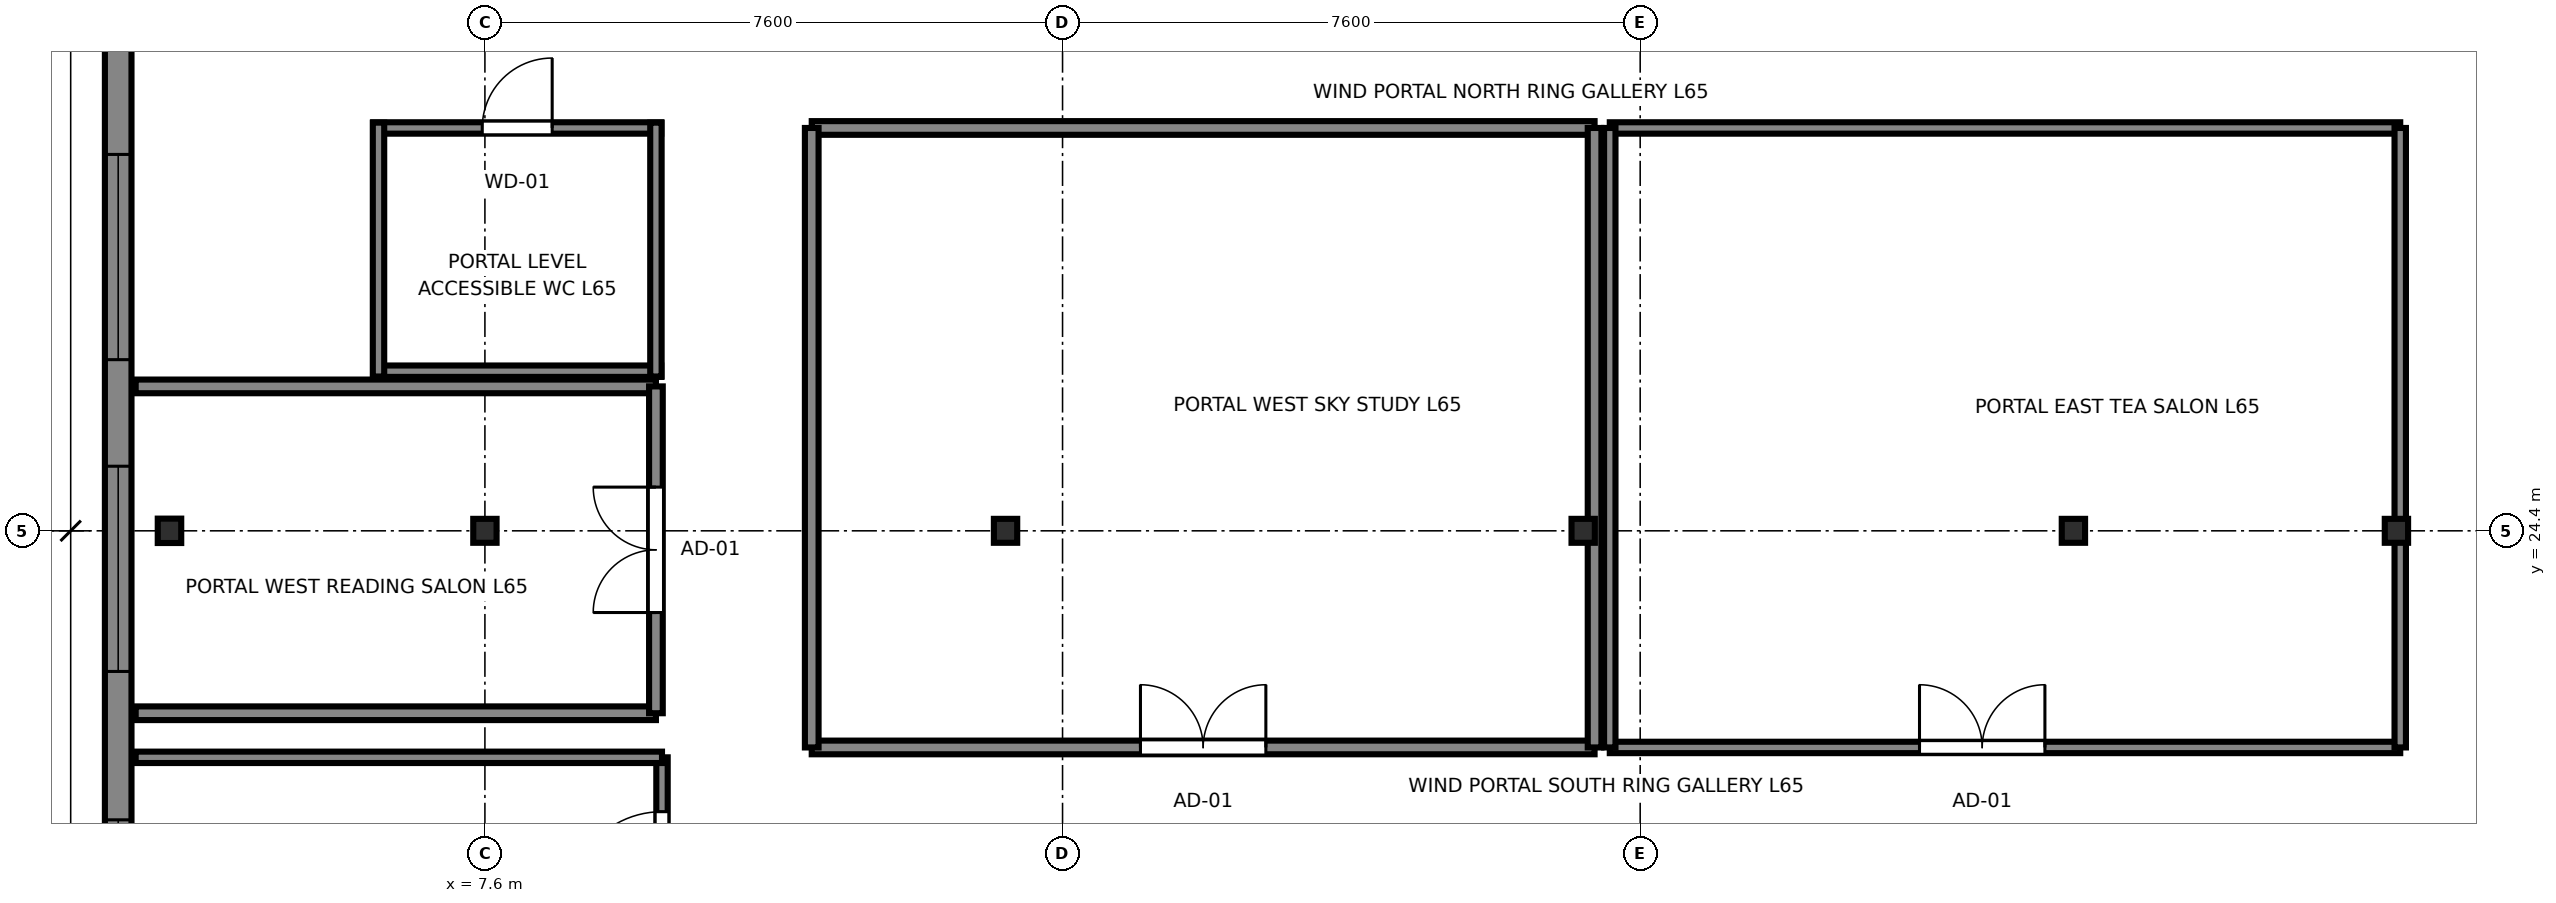
"""IFC4 building model, lengths in metres.
Left out: names, types, materials, properties, quantities, classifications, styles, units other than length and angle.
Written with IfcOpenShell. Run it as: python <this file> out.ifc"""

import sys

from ifc_helpers import new_model, si_unit, direction, frame, frame_2d, origin, origin_2d, place, context, subcontext, project, spatial, rectangle, i_section, extrude, source, transform, mapped, element, fill, save


model = new_model("IFC4")
c1 = context("Model", 3, precision=1e-05, world=origin(), true_north=direction((0.0, 1.0)))
c2 = subcontext(c1, "Body", "Model", "MODEL_VIEW")
j1 = project(units=[si_unit("LENGTHUNIT", "METRE"), si_unit("PLANEANGLEUNIT", "RADIAN")], contexts=[c1])
p1 = place(None, origin())
s1 = spatial("IfcSite", under=j1, at=p1, CompositionType="ELEMENT")
p2 = place(p1, origin())
s2 = spatial("IfcBuilding", under=s1, at=p2, CompositionType="ELEMENT")
p3 = place(p2, frame((0.0, 0.0, 245.2)))
s3 = spatial("IfcBuildingStorey", under=s2, at=p3, CompositionType="ELEMENT", Elevation=245.2)
m1 = source(origin(), c2, "Body", "SweptSolid", [
    extrude(i_section(OverallWidth=0.309, OverallDepth=0.321, WebThickness=0.014, FlangeThickness=0.022, FilletRadius=0.017, at=origin_2d()), origin(), (0.0, 0.0, 1.0), 3.55),
])
p4 = place(p3, frame((3.45, 24.4, 0.0), z_axis=(0.0, 0.0, 1.0), x_axis=(1.0, 0.0, 0.0)))
e1 = element("IfcColumn", 1, at=p4, inside=s3, PredefinedType="COLUMN", context=c2, shape_type="MappedRepresentation", body=[
    mapped(m1, transform((0.0, 0.0, 0.0), x_axis=(1.0, 0.0, 0.0), y_axis=(0.0, 1.0, 0.0), z_axis=(0.0, 0.0, 1.0), scale=1.0)),
])
m2 = source(origin(), c2, "Body", "SweptSolid", [
    extrude(i_section(OverallWidth=0.307, OverallDepth=0.315, WebThickness=0.012, FlangeThickness=0.019, FilletRadius=0.017, at=origin_2d()), origin(), (0.0, 0.0, 1.0), 3.55),
])
for number, where, z_axis, x_axis in (
    (2, (7.6, 24.4, 0.0), (0.0, 0.0, 1.0), (1.0, 0.0, 0.0)),
    (3, (14.45, 24.4, 0.0), (0.0, 0.0, 1.0), (1.0, 0.0, 0.0)),
    (4, (22.05, 24.4, 0.0), (0.0, 0.0, 1.0), (1.0, 0.0, 0.0)),
    (5, (28.5, 24.4, 0.0), (0.0, 0.0, 1.0), (1.0, 0.0, 0.0)),
    (6, (32.75, 24.4, 0.0), (0.0, 0.0, 1.0), (1.0, 0.0, 0.0)),
):
    element("IfcColumn", number, at=place(p3, frame(where, z_axis=z_axis, x_axis=x_axis)), inside=s3, PredefinedType="COLUMN", context=c2, shape_type="MappedRepresentation", body=[
        mapped(m2, transform((0.0, 0.0, 0.0), x_axis=(1.0, 0.0, 0.0), y_axis=(0.0, 1.0, 0.0), z_axis=(0.0, 0.0, 1.0), scale=1.0)),
    ])
p5 = place(p3, frame((2.775, 40.783, 0.0), z_axis=(0.0, 0.0, 1.0), x_axis=(0.0, -1.0, 0.0)))
e7 = element("IfcWall", 7, at=p5, inside=s3, PredefinedType="SOLIDWALL", context=c2, shape_type="SweptSolid", body=[
    extrude(rectangle(XDim=33.766, YDim=0.35, at=frame_2d((16.883, 0.0))), origin(), (0.0, 0.0, 1.0), 3.37),
])
p6 = place(p5, frame((1.576, 0.0, 0.68)))
e8 = element("IfcOpeningElement", 8, at=p6, cuts=e7, PredefinedType="OPENING", context=c2, shape_type="SweptSolid", body=[
    extrude(rectangle(XDim=2.7, YDim=1.95, at=frame_2d((1.35, 0.975))), frame((0.0, 0.185, 0.0), z_axis=(0.0, -1.0, 0.0), x_axis=(1.0, 0.0, 0.0)), (0.0, 0.0, 1.0), 0.37),
])
p7 = place(p5, frame((6.228, 0.0, 0.68)))
e9 = element("IfcOpeningElement", 9, at=p7, cuts=e7, PredefinedType="OPENING", context=c2, shape_type="SweptSolid", body=[
    extrude(rectangle(XDim=2.7, YDim=1.95, at=frame_2d((1.35, 0.975))), frame((0.0, 0.185, 0.0), z_axis=(0.0, -1.0, 0.0), x_axis=(1.0, 0.0, 0.0)), (0.0, 0.0, 1.0), 0.37),
])
p8 = place(p5, frame((11.431, 0.0, 0.68)))
e10 = element("IfcOpeningElement", 10, at=p8, cuts=e7, PredefinedType="OPENING", context=c2, shape_type="SweptSolid", body=[
    extrude(rectangle(XDim=2.7, YDim=1.95, at=frame_2d((1.35, 0.975))), frame((0.0, 0.185, 0.0), z_axis=(0.0, -1.0, 0.0), x_axis=(1.0, 0.0, 0.0)), (0.0, 0.0, 1.0), 0.37),
])
p9 = place(p5, frame((15.533, 0.0, 0.68)))
e11 = element("IfcOpeningElement", 11, at=p9, cuts=e7, PredefinedType="OPENING", context=c2, shape_type="SweptSolid", body=[
    extrude(rectangle(XDim=2.7, YDim=1.95, at=frame_2d((1.35, 0.975))), frame((0.0, 0.185, 0.0), z_axis=(0.0, -1.0, 0.0), x_axis=(1.0, 0.0, 0.0)), (0.0, 0.0, 1.0), 0.37),
])
p10 = place(p5, frame((20.185, 0.0, 0.68)))
e12 = element("IfcOpeningElement", 12, at=p10, cuts=e7, PredefinedType="OPENING", context=c2, shape_type="SweptSolid", body=[
    extrude(rectangle(XDim=2.7, YDim=1.95, at=frame_2d((1.35, 0.975))), frame((0.0, 0.185, 0.0), z_axis=(0.0, -1.0, 0.0), x_axis=(1.0, 0.0, 0.0)), (0.0, 0.0, 1.0), 0.37),
])
p11 = place(p5, frame((24.837, 0.0, 0.68)))
e13 = element("IfcOpeningElement", 13, at=p11, cuts=e7, PredefinedType="OPENING", context=c2, shape_type="SweptSolid", body=[
    extrude(rectangle(XDim=2.7, YDim=1.95, at=frame_2d((1.35, 0.975))), frame((0.0, 0.185, 0.0), z_axis=(0.0, -1.0, 0.0), x_axis=(1.0, 0.0, 0.0)), (0.0, 0.0, 1.0), 0.37),
])
p12 = place(p5, frame((29.489, 0.0, 0.68)))
e14 = element("IfcOpeningElement", 14, at=p12, cuts=e7, PredefinedType="OPENING", context=c2, shape_type="SweptSolid", body=[
    extrude(rectangle(XDim=2.7, YDim=1.95, at=frame_2d((1.35, 0.975))), frame((0.0, 0.185, 0.0), z_axis=(0.0, -1.0, 0.0), x_axis=(1.0, 0.0, 0.0)), (0.0, 0.0, 1.0), 0.37),
])
p13 = place(p3, frame((9.93, 18.81, 0.0), z_axis=(0.0, 0.0, 1.0), x_axis=(0.0, 1.0, 0.0)))
e15 = element("IfcWall", 15, at=p13, inside=s3, PredefinedType="PARTITIONING", context=c2, shape_type="SweptSolid", body=[
    extrude(rectangle(XDim=2.61, YDim=0.15, at=frame_2d((1.305, 0.0))), origin(), (0.0, 0.0, 1.0), 3.37),
])
p14 = place(p13, frame((0.675, 0.0, 0.0)))
e16 = element("IfcOpeningElement", 16, at=p14, cuts=e15, PredefinedType="OPENING", context=c2, shape_type="SweptSolid", body=[
    extrude(rectangle(XDim=1.22, YDim=2.08, at=frame_2d((0.61, 1.04))), frame((0.0, 0.085, 0.0), z_axis=(0.0, -1.0, 0.0), x_axis=(1.0, 0.0, 0.0)), (0.0, 0.0, 1.0), 0.17),
])
p15 = place(p3, frame((3.005, 21.42, 0.0), z_axis=(0.0, 0.0, 1.0), x_axis=(1.0, 0.0, 0.0)))
e17 = element("IfcWall", 17, at=p15, inside=s3, PredefinedType="PARTITIONING", context=c2, shape_type="SweptSolid", body=[
    extrude(rectangle(XDim=6.925, YDim=0.15, at=frame_2d((3.462, 0.0))), origin(), (0.0, 0.0, 1.0), 3.37),
])
p16 = place(p3, frame((11.9, 21.55, 0.0), z_axis=(0.0, 0.0, 1.0), x_axis=(1.0, 0.0, 0.0)))
e18 = element("IfcWall", 18, at=p16, inside=s3, PredefinedType="PARTITIONING", context=c2, shape_type="SweptSolid", body=[
    extrude(rectangle(XDim=10.3, YDim=0.18, at=frame_2d((5.15, 0.0))), origin(), (0.0, 0.0, 1.0), 3.37),
])
p17 = place(p16, frame((4.325, 0.0, 0.0)))
e19 = element("IfcOpeningElement", 19, at=p17, cuts=e18, PredefinedType="OPENING", context=c2, shape_type="SweptSolid", body=[
    extrude(rectangle(XDim=1.65, YDim=2.15, at=frame_2d((0.825, 1.075))), frame((0.0, 0.1, 0.0), z_axis=(0.0, -1.0, 0.0), x_axis=(1.0, 0.0, 0.0)), (0.0, 0.0, 1.0), 0.2),
])
p18 = place(p3, frame((11.9, 29.7, 0.0), z_axis=(0.0, 0.0, 1.0), x_axis=(1.0, 0.0, 0.0)))
e20 = element("IfcWall", 20, at=p18, inside=s3, PredefinedType="PARTITIONING", context=c2, shape_type="SweptSolid", body=[
    extrude(rectangle(XDim=10.3, YDim=0.18, at=frame_2d((5.15, 0.0))), origin(), (0.0, 0.0, 1.0), 3.37),
])
p19 = place(p3, frame((11.9, 21.55, 0.0), z_axis=(0.0, 0.0, 1.0), x_axis=(0.0, 1.0, 0.0)))
e21 = element("IfcWall", 21, at=p19, inside=s3, PredefinedType="PARTITIONING", context=c2, shape_type="SweptSolid", body=[
    extrude(rectangle(XDim=8.15, YDim=0.18, at=frame_2d((4.075, 0.0))), origin(), (0.0, 0.0, 1.0), 3.37),
])
p20 = place(p3, frame((22.2, 21.55, 0.0), z_axis=(0.0, 0.0, 1.0), x_axis=(0.0, 1.0, 0.0)))
e22 = element("IfcWall", 22, at=p20, inside=s3, PredefinedType="PARTITIONING", context=c2, shape_type="SweptSolid", body=[
    extrude(rectangle(XDim=8.15, YDim=0.18, at=frame_2d((4.075, 0.0))), origin(), (0.0, 0.0, 1.0), 2.827),
])
p21 = place(p3, frame((22.4, 21.55, 0.0), z_axis=(0.0, 0.0, 1.0), x_axis=(1.0, 0.0, 0.0)))
e23 = element("IfcWall", 23, at=p21, inside=s3, PredefinedType="PARTITIONING", context=c2, shape_type="SweptSolid", body=[
    extrude(rectangle(XDim=10.4, YDim=0.15, at=frame_2d((5.2, 0.0))), origin(), (0.0, 0.0, 1.0), 3.37),
])
p22 = place(p21, frame((4.075, 0.0, 0.0)))
e24 = element("IfcOpeningElement", 24, at=p22, cuts=e23, PredefinedType="OPENING", context=c2, shape_type="SweptSolid", body=[
    extrude(rectangle(XDim=1.65, YDim=2.15, at=frame_2d((0.825, 1.075))), frame((0.0, 0.085, 0.0), z_axis=(0.0, -1.0, 0.0), x_axis=(1.0, 0.0, 0.0)), (0.0, 0.0, 1.0), 0.17),
])
p23 = place(p3, frame((22.4, 29.7, 0.0), z_axis=(0.0, 0.0, 1.0), x_axis=(1.0, 0.0, 0.0)))
e25 = element("IfcWall", 25, at=p23, inside=s3, PredefinedType="PARTITIONING", context=c2, shape_type="SweptSolid", body=[
    extrude(rectangle(XDim=10.4, YDim=0.15, at=frame_2d((5.2, 0.0))), origin(), (0.0, 0.0, 1.0), 3.37),
])
p24 = place(p3, frame((22.4, 21.55, 0.0), z_axis=(0.0, 0.0, 1.0), x_axis=(0.0, 1.0, 0.0)))
e26 = element("IfcWall", 26, at=p24, inside=s3, PredefinedType="PARTITIONING", context=c2, shape_type="SweptSolid", body=[
    extrude(rectangle(XDim=8.15, YDim=0.15, at=frame_2d((4.075, 0.0))), origin(), (0.0, 0.0, 1.0), 3.37),
])
p25 = place(p3, frame((32.8, 21.55, 0.0), z_axis=(0.0, 0.0, 1.0), x_axis=(0.0, 1.0, 0.0)))
e27 = element("IfcWall", 27, at=p25, inside=s3, PredefinedType="PARTITIONING", context=c2, shape_type="SweptSolid", body=[
    extrude(rectangle(XDim=8.15, YDim=0.15, at=frame_2d((4.075, 0.0))), origin(), (0.0, 0.0, 1.0), 2.827),
])
for number, where, z_axis, x_axis in (
    (28, (3.005, 22.0, 0.0), (0.0, 0.0, 1.0), (1.0, 0.0, 0.0)),
    (29, (3.005, 26.3, 0.0), (0.0, 0.0, 1.0), (1.0, 0.0, 0.0)),
):
    element("IfcWall", number, at=place(p3, frame(where, z_axis=z_axis, x_axis=x_axis)), inside=s3, PredefinedType="PARTITIONING", context=c2, shape_type="SweptSolid", body=[
        extrude(rectangle(XDim=6.845, YDim=0.18, at=frame_2d((3.423, 0.0))), origin(), (0.0, 0.0, 1.0), 3.37),
    ])
p26 = place(p3, frame((9.85, 22.0, 0.0), z_axis=(0.0, 0.0, 1.0), x_axis=(0.0, 1.0, 0.0)))
e30 = element("IfcWall", 30, at=p26, inside=s3, PredefinedType="PARTITIONING", context=c2, shape_type="SweptSolid", body=[
    extrude(rectangle(XDim=4.3, YDim=0.18, at=frame_2d((2.15, 0.0))), origin(), (0.0, 0.0, 1.0), 3.37),
])
p27 = place(p26, frame((1.325, 0.0, 0.0)))
e31 = element("IfcOpeningElement", 31, at=p27, cuts=e30, PredefinedType="OPENING", context=c2, shape_type="SweptSolid", body=[
    extrude(rectangle(XDim=1.65, YDim=2.15, at=frame_2d((0.825, 1.075))), frame((0.0, 0.1, 0.0), z_axis=(0.0, -1.0, 0.0), x_axis=(1.0, 0.0, 0.0)), (0.0, 0.0, 1.0), 0.2),
])
p28 = place(p3, frame((6.13, 26.5, 0.0), z_axis=(0.0, 0.0, 1.0), x_axis=(1.0, 0.0, 0.0)))
e32 = element("IfcWall", 32, at=p28, inside=s3, PredefinedType="PARTITIONING", context=c2, shape_type="SweptSolid", body=[
    extrude(rectangle(XDim=3.79, YDim=0.15, at=frame_2d((1.895, 0.0))), origin(), (0.0, 0.0, 1.0), 3.37),
])
p29 = place(p3, frame((6.13, 29.7, 0.0), z_axis=(0.0, 0.0, 1.0), x_axis=(1.0, 0.0, 0.0)))
e33 = element("IfcWall", 33, at=p29, inside=s3, PredefinedType="PARTITIONING", context=c2, shape_type="SweptSolid", body=[
    extrude(rectangle(XDim=3.79, YDim=0.15, at=frame_2d((1.895, 0.0))), origin(), (0.0, 0.0, 1.0), 3.37),
])
p30 = place(p29, frame((1.435, 0.0, 0.0)))
e34 = element("IfcOpeningElement", 34, at=p30, cuts=e33, PredefinedType="OPENING", context=c2, shape_type="SweptSolid", body=[
    extrude(rectangle(XDim=0.92, YDim=2.01, at=frame_2d((0.46, 1.005))), frame((0.0, 0.085, 0.0), z_axis=(0.0, -1.0, 0.0), x_axis=(1.0, 0.0, 0.0)), (0.0, 0.0, 1.0), 0.17),
])
for number, where, z_axis, x_axis in (
    (35, (6.2, 26.43, 0.0), (0.0, 0.0, 1.0), (0.0, 1.0, 0.0)),
    (36, (9.85, 26.43, 0.0), (0.0, 0.0, 1.0), (0.0, 1.0, 0.0)),
):
    element("IfcWall", number, at=place(p3, frame(where, z_axis=z_axis, x_axis=x_axis)), inside=s3, PredefinedType="PARTITIONING", context=c2, shape_type="SweptSolid", body=[
        extrude(rectangle(XDim=3.34, YDim=0.15, at=frame_2d((1.67, 0.0))), origin(), (0.0, 0.0, 1.0), 3.37),
    ])
m3 = source(origin(), c2, "Body", "SweptSolid", [
    extrude(rectangle(XDim=2.7, YDim=1.95, at=frame_2d((1.35, 0.975))), frame((0.0, 0.09, 0.0), z_axis=(0.0, -1.0, 0.0), x_axis=(1.0, 0.0, 0.0)), (0.0, 0.0, 1.0), 0.06),
])
p31 = place(p8, origin())
e37 = element("IfcWindow", 37, at=p31, inside=s3, PartitioningType="TRIPLE_PANEL_HORIZONTAL", PredefinedType="WINDOW", context=c2, shape_type="MappedRepresentation", body=[
    mapped(m3, transform((0.0, 0.0, 0.0), x_axis=(1.0, 0.0, 0.0), y_axis=(0.0, 1.0, 0.0), z_axis=(0.0, 0.0, 1.0), scale=1.0)),
])
fill(e10, e37)
p32 = place(p9, origin())
e38 = element("IfcWindow", 38, at=p32, inside=s3, PartitioningType="TRIPLE_PANEL_HORIZONTAL", PredefinedType="WINDOW", context=c2, shape_type="MappedRepresentation", body=[
    mapped(m3, transform((0.0, 0.0, 0.0), x_axis=(1.0, 0.0, 0.0), y_axis=(0.0, 1.0, 0.0), z_axis=(0.0, 0.0, 1.0), scale=1.0)),
])
fill(e11, e38)
p33 = place(p10, origin())
e39 = element("IfcWindow", 39, at=p33, inside=s3, PartitioningType="TRIPLE_PANEL_HORIZONTAL", PredefinedType="WINDOW", context=c2, shape_type="MappedRepresentation", body=[
    mapped(m3, transform((0.0, 0.0, 0.0), x_axis=(1.0, 0.0, 0.0), y_axis=(0.0, 1.0, 0.0), z_axis=(0.0, 0.0, 1.0), scale=1.0)),
])
fill(e12, e39)
m4 = source(origin(), c2, "Body", "SweptSolid", [
    extrude(rectangle(XDim=1.22, YDim=2.08, at=frame_2d((0.61, 1.04))), frame((0.0, 0.025, 0.0), z_axis=(0.0, -1.0, 0.0), x_axis=(1.0, 0.0, 0.0)), (0.0, 0.0, 1.0), 0.05),
])
p34 = place(p14, origin())
e40 = element("IfcDoor", 40, at=p34, inside=s3, OperationType="SINGLE_SWING_LEFT", PredefinedType="DOOR", context=c2, shape_type="MappedRepresentation", body=[
    mapped(m4, transform((0.0, 0.0, 0.0), x_axis=(1.0, 0.0, 0.0), y_axis=(0.0, 1.0, 0.0), z_axis=(0.0, 0.0, 1.0), scale=1.0)),
])
fill(e16, e40)
m5 = source(origin(), c2, "Body", "SweptSolid", [
    extrude(rectangle(XDim=1.65, YDim=2.15, at=frame_2d((0.825, 1.075))), frame((0.0, 0.025, 0.0), z_axis=(0.0, -1.0, 0.0), x_axis=(1.0, 0.0, 0.0)), (0.0, 0.0, 1.0), 0.05),
])
p35 = place(p17, origin())
e41 = element("IfcDoor", 41, at=p35, inside=s3, OperationType="DOUBLE_DOOR_SINGLE_SWING", PredefinedType="DOOR", context=c2, shape_type="MappedRepresentation", body=[
    mapped(m5, transform((0.0, 0.0, 0.0), x_axis=(1.0, 0.0, 0.0), y_axis=(0.0, 1.0, 0.0), z_axis=(0.0, 0.0, 1.0), scale=1.0)),
])
fill(e19, e41)
p36 = place(p22, origin())
e42 = element("IfcDoor", 42, at=p36, inside=s3, OperationType="DOUBLE_DOOR_SINGLE_SWING", PredefinedType="DOOR", context=c2, shape_type="MappedRepresentation", body=[
    mapped(m5, transform((0.0, 0.0, 0.0), x_axis=(1.0, 0.0, 0.0), y_axis=(0.0, 1.0, 0.0), z_axis=(0.0, 0.0, 1.0), scale=1.0)),
])
fill(e24, e42)
p37 = place(p27, origin())
e43 = element("IfcDoor", 43, at=p37, inside=s3, OperationType="DOUBLE_DOOR_SINGLE_SWING", PredefinedType="DOOR", context=c2, shape_type="MappedRepresentation", body=[
    mapped(m5, transform((0.0, 0.0, 0.0), x_axis=(1.0, 0.0, 0.0), y_axis=(0.0, 1.0, 0.0), z_axis=(0.0, 0.0, 1.0), scale=1.0)),
])
fill(e31, e43)
m6 = source(origin(), c2, "Body", "SweptSolid", [
    extrude(rectangle(XDim=0.92, YDim=2.01, at=frame_2d((0.46, 1.005))), frame((0.0, 0.025, 0.0), z_axis=(0.0, -1.0, 0.0), x_axis=(1.0, 0.0, 0.0)), (0.0, 0.0, 1.0), 0.05),
])
p38 = place(p30, origin())
e44 = element("IfcDoor", 44, at=p38, inside=s3, OperationType="SINGLE_SWING_RIGHT", PredefinedType="DOOR", context=c2, shape_type="MappedRepresentation", body=[
    mapped(m6, transform((0.0, 0.0, 0.0), x_axis=(1.0, 0.0, 0.0), y_axis=(0.0, 1.0, 0.0), z_axis=(0.0, 0.0, 1.0), scale=1.0)),
])
fill(e34, e44)
save(model, sys.argv[1])
